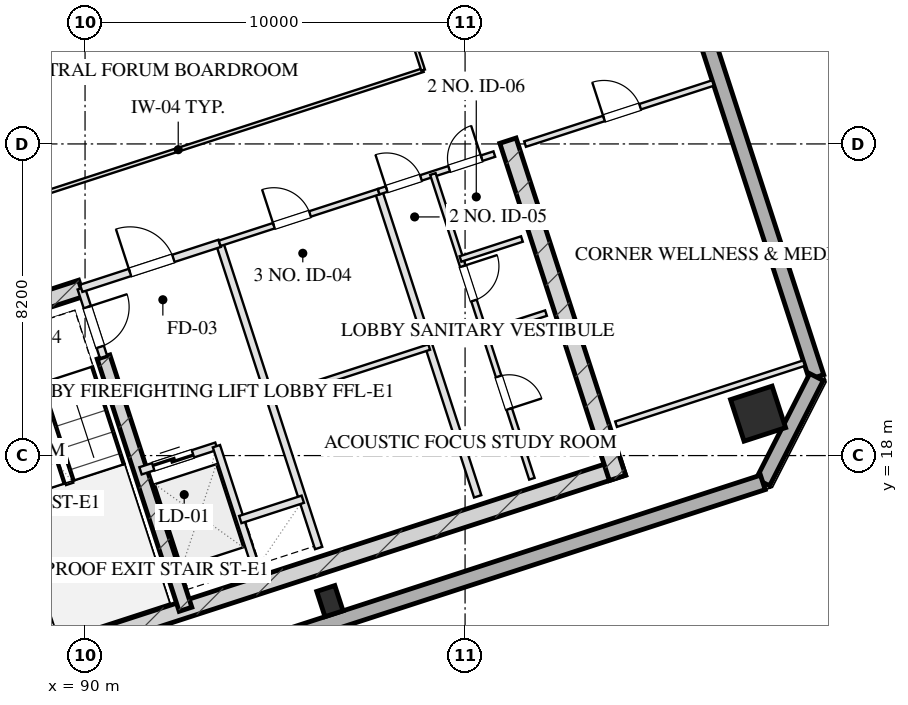
"""IFC4 building model, lengths in metres.
Left out: names, types, materials, properties, quantities, classifications, styles, units other than length and angle.
Written with IfcOpenShell. Run it as: python <this file> out.ifc"""

import sys

from ifc_helpers import new_model, si_unit, direction, frame, frame_2d, origin, origin_2d, place, context, subcontext, project, spatial, rectangle, hollow_rectangle, extrude, element, fill, save


model = new_model("IFC4")
c1 = context("Model", 3, precision=1e-05, world=origin(), true_north=direction((0.0, 1.0)))
c2 = subcontext(c1, "Body", "Model", "MODEL_VIEW")
j1 = project(units=[si_unit("LENGTHUNIT", "METRE"), si_unit("PLANEANGLEUNIT", "RADIAN")], contexts=[c1])
p1 = place(None, origin())
s1 = spatial("IfcSite", under=j1, at=p1, CompositionType="ELEMENT")
p2 = place(p1, origin())
s2 = spatial("IfcBuilding", under=s1, at=p2, CompositionType="ELEMENT")
p3 = place(p2, frame((0.0, 0.0, 212.75)))
s3 = spatial("IfcBuildingStorey", under=s2, at=p3, CompositionType="ELEMENT", Elevation=212.75)
p4 = place(p3, frame((88.701, 12.675, 0.0), z_axis=(0.0, 0.0, 1.0), x_axis=(0.95105824505, 0.309011673763, 0.0)))
e1 = element("IfcWall", 1, at=p4, inside=s3, PredefinedType="SHEAR", context=c2, shape_type="SweptSolid", body=[
    extrude(rectangle(XDim=16.25, YDim=0.45, at=frame_2d((8.125, 0.0))), origin(), (0.0, 0.0, 1.0), 3.45),
])
for number, where, z_axis, x_axis in (
    (2, (86.102, 21.404, 0.0), (0.0, 0.0, 1.0), (0.309, -0.951, 0.0)),
    (3, (101.128, 26.286, 0.0), (0.0, 0.0, 1.0), (0.309, -0.951, 0.0)),
):
    element("IfcWall", number, at=place(p3, frame(where, z_axis=z_axis, x_axis=x_axis)), inside=s3, PredefinedType="SHEAR", context=c2, shape_type="SweptSolid", body=[
        extrude(rectangle(XDim=9.33, YDim=0.45, at=frame_2d((4.665, 0.0))), origin(), (0.0, 0.0, 1.0), 3.45),
    ])
p5 = place(p3, frame((90.486, 20.594, 0.0), z_axis=(0.0, 0.0, 1.0), x_axis=(0.309020428229, -0.951055400562, 0.0)))
e4 = element("IfcWall", 4, at=p5, inside=s3, PredefinedType="SHEAR", context=c2, shape_type="SweptSolid", body=[
    extrude(rectangle(XDim=6.98, YDim=0.35, at=frame_2d((3.49, 0.0))), origin(), (0.0, 0.0, 1.0), 3.45),
])
p6 = place(p3, frame((85.957, 21.12, 0.0), z_axis=(0.0, 0.0, 1.0), x_axis=(0.951064796122, 0.308991510526, 0.0)))
e5 = element("IfcWall", 5, at=p6, inside=s3, PredefinedType="SHEAR", context=c2, shape_type="SweptSolid", body=[
    extrude(rectangle(XDim=4.145, YDim=0.45, at=frame_2d((2.073, 0.0))), origin(), (0.0, 0.0, 1.0), 3.45),
])
p7 = place(p3, frame((107.71, 19.104, 0.0), z_axis=(0.0, 0.0, 1.0), x_axis=(0.951056516295, 0.309016994375, 0.0)))
e6 = element("IfcColumn", 6, at=p7, inside=s3, PredefinedType="COLUMN", context=c2, shape_type="SweptSolid", body=[
    extrude(hollow_rectangle(XDim=1.15, YDim=1.15, WallThickness=0.04, at=origin_2d()), origin(), (0.0, 0.0, 1.0), 3.451),
])
p8 = place(p3, frame((96.443, 14.17, 0.0), z_axis=(0.0, 0.0, 1.0), x_axis=(0.951056516295, 0.309016994375, 0.0)))
e7 = element("IfcColumn", 7, at=p8, inside=s3, PredefinedType="COLUMN", context=c2, shape_type="SweptSolid", body=[
    extrude(hollow_rectangle(XDim=0.5, YDim=0.7, WallThickness=0.025, at=origin_2d()), origin(), (0.0, 0.0, 1.0), 3.451),
])
p9 = place(p3, frame((97.382, 56.586, 0.0), z_axis=(0.0, 0.0, 1.0), x_axis=(0.309016491071, -0.951056679828, 0.0)))
e8 = element("IfcWall", 8, at=p9, inside=s3, PredefinedType="SOLIDWALL", context=c2, shape_type="SweptSolid", body=[
    extrude(rectangle(XDim=38.4, YDim=0.4, at=frame_2d((19.2, 0.0))), origin(), (0.0, 0.0, 1.0), 2.55),
])
p10 = place(p9, frame((24.55, 0.0, 0.75)))
e9 = element("IfcOpeningElement", 9, at=p10, cuts=e8, PredefinedType="OPENING", context=c2, shape_type="SweptSolid", body=[
    extrude(rectangle(XDim=2.1, YDim=1.4, at=frame_2d((1.05, 0.7))), frame((0.0, 0.21, 0.0), z_axis=(0.0, -1.0, 0.0), x_axis=(1.0, 0.0, 0.0)), (0.0, 0.0, 1.0), 0.42),
])
p11 = place(p9, frame((20.75, 0.0, 0.75)))
e10 = element("IfcOpeningElement", 10, at=p11, cuts=e8, PredefinedType="OPENING", context=c2, shape_type="SweptSolid", body=[
    extrude(rectangle(XDim=2.1, YDim=1.4, at=frame_2d((1.05, 0.7))), frame((0.0, 0.21, 0.0), z_axis=(0.0, -1.0, 0.0), x_axis=(1.0, 0.0, 0.0)), (0.0, 0.0, 1.0), 0.42),
])
p12 = place(p9, frame((15.55, 0.0, 0.75)))
e11 = element("IfcOpeningElement", 11, at=p12, cuts=e8, PredefinedType="OPENING", context=c2, shape_type="SweptSolid", body=[
    extrude(rectangle(XDim=2.1, YDim=1.4, at=frame_2d((1.05, 0.7))), frame((0.0, 0.21, 0.0), z_axis=(0.0, -1.0, 0.0), x_axis=(1.0, 0.0, 0.0)), (0.0, 0.0, 1.0), 0.42),
])
p13 = place(p9, frame((11.75, 0.0, 0.75)))
e12 = element("IfcOpeningElement", 12, at=p13, cuts=e8, PredefinedType="OPENING", context=c2, shape_type="SweptSolid", body=[
    extrude(rectangle(XDim=2.1, YDim=1.4, at=frame_2d((1.05, 0.7))), frame((0.0, 0.21, 0.0), z_axis=(0.0, -1.0, 0.0), x_axis=(1.0, 0.0, 0.0)), (0.0, 0.0, 1.0), 0.42),
])
p14 = place(p3, frame((109.248, 20.066, 0.0), z_axis=(0.0, 0.0, 1.0), x_axis=(-0.453949291228, -0.891027519774, 0.0)))
e13 = element("IfcWall", 13, at=p14, inside=s3, PredefinedType="SOLIDWALL", context=c2, shape_type="SweptSolid", body=[
    extrude(rectangle(XDim=3.111, YDim=0.4, at=frame_2d((1.556, 0.0))), origin(), (0.0, 0.0, 1.0), 2.55),
])
p15 = place(p3, frame((107.835, 17.294, 0.0), z_axis=(0.0, 0.0, 1.0), x_axis=(-0.951058012937, -0.309012388148, 0.0)))
e14 = element("IfcWall", 14, at=p15, inside=s3, PredefinedType="SOLIDWALL", context=c2, shape_type="SweptSolid", body=[
    extrude(rectangle(XDim=23.6, YDim=0.4, at=frame_2d((11.8, 0.0))), origin(), (0.0, 0.0, 1.0), 2.55),
])
p16 = place(p3, frame((89.899, 22.401, 0.0), z_axis=(0.0, 0.0, 1.0), x_axis=(0.308932062672, -0.951084108086, 0.0)))
e15 = element("IfcWall", 15, at=p16, inside=s3, PredefinedType="PARTITIONING", context=c2, shape_type="SweptSolid", body=[
    extrude(rectangle(XDim=1.9, YDim=0.2, at=frame_2d((0.95, 0.0))), origin(), (0.0, 0.0, 1.0), 3.155),
])
p17 = place(p16, frame((0.52, 0.0, 0.0)))
e16 = element("IfcOpeningElement", 16, at=p17, cuts=e15, PredefinedType="OPENING", context=c2, shape_type="SweptSolid", body=[
    extrude(rectangle(XDim=1.1, YDim=2.05, at=frame_2d((0.55, 1.025))), frame((0.0, 0.11, 0.0), z_axis=(0.0, -1.0, 0.0), x_axis=(1.0, 0.0, 0.0)), (0.0, 0.0, 1.0), 0.22),
])
p18 = place(p3, frame((93.542, 23.585, 0.0), z_axis=(0.0, 0.0, 1.0), x_axis=(0.309042196757, -0.951048327176, 0.0)))
e17 = element("IfcWall", 17, at=p18, inside=s3, PredefinedType="PARTITIONING", context=c2, shape_type="SweptSolid", body=[
    extrude(rectangle(XDim=8.43, YDim=0.2, at=frame_2d((4.215, 0.0))), origin(), (0.0, 0.0, 1.0), 3.155),
])
p19 = place(p3, frame((89.899, 22.401, 0.0), z_axis=(0.0, 0.0, 1.0), x_axis=(0.951046716504, 0.309047153403, 0.0)))
e18 = element("IfcWall", 18, at=p19, inside=s3, PredefinedType="PARTITIONING", context=c2, shape_type="SweptSolid", body=[
    extrude(rectangle(XDim=3.83, YDim=0.2, at=frame_2d((1.915, 0.0))), origin(), (0.0, 0.0, 1.0), 3.155),
])
p20 = place(p19, frame((1.35, 0.0, 0.0)))
e19 = element("IfcOpeningElement", 19, at=p20, cuts=e18, PredefinedType="OPENING", context=c2, shape_type="SweptSolid", body=[
    extrude(rectangle(XDim=1.2, YDim=2.05, at=frame_2d((0.6, 1.025))), frame((0.0, 0.11, 0.0), z_axis=(0.0, -1.0, 0.0), x_axis=(1.0, 0.0, 0.0)), (0.0, 0.0, 1.0), 0.22),
])
p21 = place(p3, frame((91.46, 17.598, 0.0), z_axis=(0.0, 0.0, 1.0), x_axis=(0.951062257173, 0.308999325213, 0.0)))
e20 = element("IfcWall", 20, at=p21, inside=s3, PredefinedType="PARTITIONING", context=c2, shape_type="SweptSolid", body=[
    extrude(rectangle(XDim=2.1, YDim=0.2, at=frame_2d((1.05, 0.0))), origin(), (0.0, 0.0, 1.0), 3.155),
])
p22 = place(p21, frame((0.35, 0.0, 0.0)))
e21 = element("IfcOpeningElement", 21, at=p22, cuts=e20, PredefinedType="OPENING", context=c2, shape_type="SweptSolid", body=[
    extrude(rectangle(XDim=1.1, YDim=2.05, at=frame_2d((0.55, 1.025))), frame((0.0, 0.11, 0.0), z_axis=(0.0, -1.0, 0.0), x_axis=(1.0, 0.0, 0.0)), (0.0, 0.0, 1.0), 0.22),
])
p23 = place(p3, frame((93.457, 18.247, 0.0), z_axis=(0.0, 0.0, 1.0), x_axis=(0.3089935693, -0.951064127245, 0.0)))
e22 = element("IfcWall", 22, at=p23, inside=s3, PredefinedType="PARTITIONING", context=c2, shape_type="SweptSolid", body=[
    extrude(rectangle(XDim=3.7, YDim=0.2, at=frame_2d((1.85, 0.0))), origin(), (0.0, 0.0, 1.0), 3.155),
])
p24 = place(p3, frame((94.084, 16.317, 0.0), z_axis=(0.0, 0.0, 1.0), x_axis=(0.951041328149, 0.309063734775, 0.0)))
e23 = element("IfcWall", 23, at=p24, inside=s3, PredefinedType="PARTITIONING", context=c2, shape_type="SweptSolid", body=[
    extrude(rectangle(XDim=1.73, YDim=0.2, at=frame_2d((0.865, 0.0))), origin(), (0.0, 0.0, 1.0), 3.155),
])
p25 = place(p3, frame((97.727, 24.944, 0.0), z_axis=(0.0, 0.0, 1.0), x_axis=(0.309016001439, -0.951056838919, 0.0)))
e24 = element("IfcWall", 24, at=p25, inside=s3, PredefinedType="PARTITIONING", context=c2, shape_type="SweptSolid", body=[
    extrude(rectangle(XDim=8.43, YDim=0.2, at=frame_2d((4.215, 0.0))), origin(), (0.0, 0.0, 1.0), 3.155),
])
p26 = place(p3, frame((93.542, 23.585, 0.0), z_axis=(0.0, 0.0, 1.0), x_axis=(0.951063829732, 0.308994485023, 0.0)))
e25 = element("IfcWall", 25, at=p26, inside=s3, PredefinedType="PARTITIONING", context=c2, shape_type="SweptSolid", body=[
    extrude(rectangle(XDim=4.4, YDim=0.15, at=frame_2d((2.2, 0.0))), origin(), (0.0, 0.0, 1.0), 3.155),
])
p27 = place(p26, frame((1.5, 0.0, 0.0)))
e26 = element("IfcOpeningElement", 26, at=p27, cuts=e25, PredefinedType="OPENING", context=c2, shape_type="SweptSolid", body=[
    extrude(rectangle(XDim=1.0, YDim=2.05, at=frame_2d((0.5, 1.025))), frame((0.0, 0.085, 0.0), z_axis=(0.0, -1.0, 0.0), x_axis=(1.0, 0.0, 0.0)), (0.0, 0.0, 1.0), 0.17),
])
p28 = place(p3, frame((94.871, 19.495, 0.0), z_axis=(0.0, 0.0, 1.0), x_axis=(0.951042223598, 0.309060979314, 0.0)))
e27 = element("IfcWall", 27, at=p28, inside=s3, PredefinedType="PARTITIONING", context=c2, shape_type="SweptSolid", body=[
    extrude(rectangle(XDim=4.4, YDim=0.15, at=frame_2d((2.2, 0.0))), origin(), (0.0, 0.0, 1.0), 3.155),
])
p29 = place(p3, frame((97.727, 24.944, 0.0), z_axis=(0.0, 0.0, 1.0), x_axis=(0.951036872128, 0.309077446369, 0.0)))
e28 = element("IfcWall", 28, at=p29, inside=s3, PredefinedType="PARTITIONING", context=c2, shape_type="SweptSolid", body=[
    extrude(rectangle(XDim=3.2, YDim=0.15, at=frame_2d((1.6, 0.0))), origin(), (0.0, 0.0, 1.0), 3.155),
])
p30 = place(p29, frame((0.22, 0.0, 0.0)))
e29 = element("IfcOpeningElement", 29, at=p30, cuts=e28, PredefinedType="OPENING", context=c2, shape_type="SweptSolid", body=[
    extrude(rectangle(XDim=0.95, YDim=2.05, at=frame_2d((0.475, 1.025))), frame((0.0, 0.085, 0.0), z_axis=(0.0, -1.0, 0.0), x_axis=(1.0, 0.0, 0.0)), (0.0, 0.0, 1.0), 0.17),
])
p31 = place(p29, frame((1.95, 0.0, 0.0)))
e30 = element("IfcOpeningElement", 30, at=p31, cuts=e28, PredefinedType="OPENING", context=c2, shape_type="SweptSolid", body=[
    extrude(rectangle(XDim=0.9, YDim=2.05, at=frame_2d((0.45, 1.025))), frame((0.0, 0.085, 0.0), z_axis=(0.0, -1.0, 0.0), x_axis=(1.0, 0.0, 0.0)), (0.0, 0.0, 1.0), 0.17),
])
p32 = place(p3, frame((99.153, 25.408, 0.0), z_axis=(0.0, 0.0, 1.0), x_axis=(0.309016001439, -0.951056838919, 0.0)))
e31 = element("IfcWall", 31, at=p32, inside=s3, PredefinedType="PARTITIONING", context=c2, shape_type="SweptSolid", body=[
    extrude(rectangle(XDim=8.43, YDim=0.15, at=frame_2d((4.215, 0.0))), origin(), (0.0, 0.0, 1.0), 3.155),
])
p33 = place(p32, frame((2.55, 0.0, 0.0)))
e32 = element("IfcOpeningElement", 32, at=p33, cuts=e31, PredefinedType="OPENING", context=c2, shape_type="SweptSolid", body=[
    extrude(rectangle(XDim=0.95, YDim=2.05, at=frame_2d((0.475, 1.025))), frame((0.0, 0.085, 0.0), z_axis=(0.0, -1.0, 0.0), x_axis=(1.0, 0.0, 0.0)), (0.0, 0.0, 1.0), 0.17),
])
p34 = place(p32, frame((5.6, 0.0, 0.0)))
e33 = element("IfcOpeningElement", 33, at=p34, cuts=e31, PredefinedType="OPENING", context=c2, shape_type="SweptSolid", body=[
    extrude(rectangle(XDim=0.9, YDim=2.05, at=frame_2d((0.45, 1.025))), frame((0.0, 0.085, 0.0), z_axis=(0.0, -1.0, 0.0), x_axis=(1.0, 0.0, 0.0)), (0.0, 0.0, 1.0), 0.17),
])
for number, where, z_axis, x_axis in (
    (34, (100.513, 21.223, 0.0), (0.0, 0.0, 1.0), (0.951, 0.309, 0.0)),
    (35, (99.879, 23.173, 0.0), (0.0, 0.0, 1.0), (0.951, 0.309, 0.0)),
):
    element("IfcWall", number, at=place(p3, frame(where, z_axis=z_axis, x_axis=x_axis)), inside=s3, PredefinedType="PARTITIONING", context=c2, shape_type="SweptSolid", body=[
        extrude(rectangle(XDim=1.7, YDim=0.15, at=frame_2d((0.85, 0.0))), origin(), (0.0, 0.0, 1.0), 3.155),
    ])
p35 = place(p3, frame((103.973, 18.825, 0.0), z_axis=(0.0, 0.0, 1.0), x_axis=(0.951055112834, 0.309021313752, 0.0)))
e36 = element("IfcWall", 36, at=p35, inside=s3, PredefinedType="PARTITIONING", context=c2, shape_type="SweptSolid", body=[
    extrude(rectangle(XDim=5.2, YDim=0.15, at=frame_2d((2.6, 0.0))), origin(), (0.0, 0.0, 1.0), 3.155),
])
p36 = place(p3, frame((101.578, 26.196, 0.0), z_axis=(0.0, 0.0, 1.0), x_axis=(0.951064427824, 0.308992644131, 0.0)))
e37 = element("IfcWall", 37, at=p36, inside=s3, PredefinedType="PARTITIONING", context=c2, shape_type="SweptSolid", body=[
    extrude(rectangle(XDim=5.2, YDim=0.15, at=frame_2d((2.6, 0.0))), origin(), (0.0, 0.0, 1.0), 3.155),
])
p37 = place(p36, frame((2.184, 0.0, 0.0)))
e38 = element("IfcOpeningElement", 38, at=p37, cuts=e37, PredefinedType="OPENING", context=c2, shape_type="SweptSolid", body=[
    extrude(rectangle(XDim=1.0, YDim=2.05, at=frame_2d((0.5, 1.025))), frame((0.0, 0.085, 0.0), z_axis=(0.0, -1.0, 0.0), x_axis=(1.0, 0.0, 0.0)), (0.0, 0.0, 1.0), 0.17),
])
p38 = place(p3, frame((86.009, 23.955, 0.0), z_axis=(0.0, 0.0, 1.0), x_axis=(0.951059488241, 0.309007847517, 0.0)))
e39 = element("IfcWall", 39, at=p38, inside=s3, PredefinedType="MOVABLE", context=c2, shape_type="SweptSolid", body=[
    extrude(rectangle(XDim=13.55, YDim=0.1, at=frame_2d((6.775, 0.0))), origin(), (0.0, 0.0, 1.0), 3.155),
])
p39 = place(p3, frame((98.896, 28.142, 0.0), z_axis=(0.0, 0.0, 1.0), x_axis=(-0.30901773025, 0.951056277195, 0.0)))
e40 = element("IfcWall", 40, at=p39, inside=s3, PredefinedType="MOVABLE", context=c2, shape_type="SweptSolid", body=[
    extrude(rectangle(XDim=16.64, YDim=0.1, at=frame_2d((8.32, 0.0))), origin(), (0.0, 0.0, 1.0), 3.155),
])
p40 = place(p39, frame((7.68, 0.0, 0.0)))
e41 = element("IfcOpeningElement", 41, at=p40, cuts=e40, PredefinedType="OPENING", context=c2, shape_type="SweptSolid", body=[
    extrude(rectangle(XDim=1.1, YDim=2.05, at=frame_2d((0.55, 1.025))), frame((0.0, 0.06, 0.0), z_axis=(0.0, -1.0, 0.0), x_axis=(1.0, 0.0, 0.0)), (0.0, 0.0, 1.0), 0.12),
])
p41 = place(p3, frame((84.674, 28.063, 0.0), z_axis=(0.0, 0.0, 1.0), x_axis=(0.951054192928, 0.309024144872, 0.0)))
e42 = element("IfcWall", 42, at=p41, inside=s3, PredefinedType="MOVABLE", context=c2, shape_type="SweptSolid", body=[
    extrude(rectangle(XDim=13.55, YDim=0.1, at=frame_2d((6.775, 0.0))), origin(), (0.0, 0.0, 1.0), 3.155),
])
p42 = place(p17, origin())
e43 = element("IfcDoor", 43, at=p42, inside=s3, OperationType="SINGLE_SWING_LEFT", PredefinedType="DOOR", context=c2, shape_type="SweptSolid", body=[
    extrude(rectangle(XDim=1.1, YDim=2.05, at=frame_2d((0.55, 1.025))), frame((0.0, 0.025, 0.0), z_axis=(0.0, -1.0, 0.0), x_axis=(1.0, 0.0, 0.0)), (0.0, 0.0, 1.0), 0.05),
])
fill(e16, e43)
p43 = place(p20, origin())
e44 = element("IfcDoor", 44, at=p43, inside=s3, OperationType="SINGLE_SWING_LEFT", PredefinedType="DOOR", context=c2, shape_type="SweptSolid", body=[
    extrude(rectangle(XDim=1.2, YDim=2.05, at=frame_2d((0.6, 1.025))), frame((0.0, 0.025, 0.0), z_axis=(0.0, -1.0, 0.0), x_axis=(1.0, 0.0, 0.0)), (0.0, 0.0, 1.0), 0.05),
])
fill(e19, e44)
p44 = place(p22, origin())
e45 = element("IfcDoor", 45, at=p44, inside=s3, OperationType="DOUBLE_DOOR_SLIDING", PredefinedType="DOOR", context=c2, shape_type="SweptSolid", body=[
    extrude(rectangle(XDim=1.1, YDim=2.05, at=frame_2d((0.55, 1.025))), frame((0.0, 0.025, 0.0), z_axis=(0.0, -1.0, 0.0), x_axis=(1.0, 0.0, 0.0)), (0.0, 0.0, 1.0), 0.05),
])
fill(e21, e45)
p45 = place(p27, origin())
e46 = element("IfcDoor", 46, at=p45, inside=s3, OperationType="SINGLE_SWING_LEFT", PredefinedType="DOOR", context=c2, shape_type="SweptSolid", body=[
    extrude(rectangle(XDim=1.0, YDim=2.05, at=frame_2d((0.5, 1.025))), frame((0.0, 0.025, 0.0), z_axis=(0.0, -1.0, 0.0), x_axis=(1.0, 0.0, 0.0)), (0.0, 0.0, 1.0), 0.05),
])
fill(e26, e46)
p46 = place(p30, origin())
e47 = element("IfcDoor", 47, at=p46, inside=s3, OperationType="SINGLE_SWING_LEFT", PredefinedType="DOOR", context=c2, shape_type="SweptSolid", body=[
    extrude(rectangle(XDim=0.95, YDim=2.05, at=frame_2d((0.475, 1.025))), frame((0.0, 0.025, 0.0), z_axis=(0.0, -1.0, 0.0), x_axis=(1.0, 0.0, 0.0)), (0.0, 0.0, 1.0), 0.05),
])
fill(e29, e47)
p47 = place(p31, origin())
e48 = element("IfcDoor", 48, at=p47, inside=s3, OperationType="SINGLE_SWING_RIGHT", PredefinedType="DOOR", context=c2, shape_type="SweptSolid", body=[
    extrude(rectangle(XDim=0.9, YDim=2.05, at=frame_2d((0.45, 1.025))), frame((0.0, 0.025, 0.0), z_axis=(0.0, -1.0, 0.0), x_axis=(1.0, 0.0, 0.0)), (0.0, 0.0, 1.0), 0.05),
])
fill(e30, e48)
p48 = place(p33, origin())
e49 = element("IfcDoor", 49, at=p48, inside=s3, OperationType="SINGLE_SWING_LEFT", PredefinedType="DOOR", context=c2, shape_type="SweptSolid", body=[
    extrude(rectangle(XDim=0.95, YDim=2.05, at=frame_2d((0.475, 1.025))), frame((0.0, 0.025, 0.0), z_axis=(0.0, -1.0, 0.0), x_axis=(1.0, 0.0, 0.0)), (0.0, 0.0, 1.0), 0.05),
])
fill(e32, e49)
p49 = place(p34, origin())
e50 = element("IfcDoor", 50, at=p49, inside=s3, OperationType="SINGLE_SWING_RIGHT", PredefinedType="DOOR", context=c2, shape_type="SweptSolid", body=[
    extrude(rectangle(XDim=0.9, YDim=2.05, at=frame_2d((0.45, 1.025))), frame((0.0, 0.025, 0.0), z_axis=(0.0, -1.0, 0.0), x_axis=(1.0, 0.0, 0.0)), (0.0, 0.0, 1.0), 0.05),
])
fill(e33, e50)
p50 = place(p37, origin())
e51 = element("IfcDoor", 51, at=p50, inside=s3, OperationType="SINGLE_SWING_LEFT", PredefinedType="DOOR", context=c2, shape_type="SweptSolid", body=[
    extrude(rectangle(XDim=1.0, YDim=2.05, at=frame_2d((0.5, 1.025))), frame((0.0, 0.025, 0.0), z_axis=(0.0, -1.0, 0.0), x_axis=(1.0, 0.0, 0.0)), (0.0, 0.0, 1.0), 0.05),
])
fill(e38, e51)
save(model, sys.argv[1])
